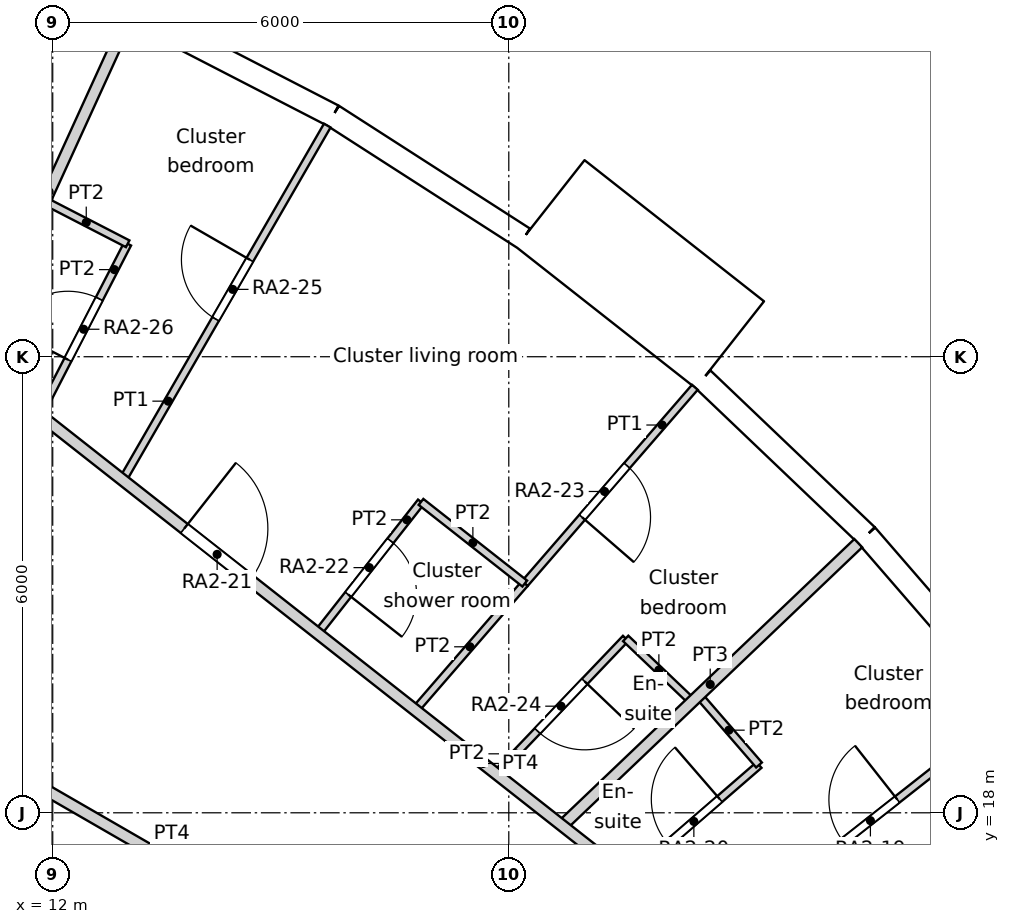
"""IFC4 building model, lengths in metres.
Left out: names, types, materials, properties, quantities, classifications, styles, units other than length and angle.
Written with IfcOpenShell. Run it as: python <this file> out.ifc"""

import sys

from ifc_helpers import new_model, si_unit, direction, frame, frame_2d, origin, origin_2d, place, context, subcontext, project, spatial, rectangle, circle, extrude, element, fill, save


model = new_model("IFC4")
c1 = context("Model", 3, precision=1e-05, world=origin(), true_north=direction((0.0, 1.0)))
c2 = subcontext(c1, "Body", "Model", "MODEL_VIEW")
j1 = project(units=[si_unit("LENGTHUNIT", "METRE"), si_unit("PLANEANGLEUNIT", "RADIAN")], contexts=[c1])
p1 = place(None, origin())
s1 = spatial("IfcSite", under=j1, at=p1, CompositionType="ELEMENT")
p2 = place(p1, origin())
s2 = spatial("IfcBuilding", under=s1, at=p2, CompositionType="ELEMENT")
p3 = place(p2, frame((0.0, 0.0, 39.0)))
s3 = spatial("IfcBuildingStorey", under=s2, at=p3, CompositionType="ELEMENT", Elevation=39.0)
for number, where, z_axis, x_axis in (
    (1, (21.911, 20.892, 0.0), (0.0, 0.0, 1.0), (1.0, 0.0, 0.0)),
    (2, (17.561, 24.661, 0.0), (0.0, 0.0, 1.0), (1.0, 0.0, 0.0)),
    (3, (12.576, 27.539, 0.0), (0.0, 0.0, 1.0), (1.0, 0.0, 0.0)),
):
    element("IfcColumn", number, at=place(p3, frame(where, z_axis=z_axis, x_axis=x_axis)), inside=s3, PredefinedType="COLUMN", context=c2, shape_type="SweptSolid", body=[
        extrude(circle(Radius=0.7, at=origin_2d()), origin(), (0.0, 0.0, 1.0), 3.6),
    ])
p4 = place(p3, frame((14.659, 19.69, 0.0), z_axis=(0.0, 0.0, 1.0), x_axis=(1.0, 0.0, 0.0)))
e4 = element("IfcColumn", 4, at=p4, inside=s3, PredefinedType="COLUMN", context=c2, shape_type="SweptSolid", body=[
    extrude(circle(Radius=0.75, at=origin_2d()), origin(), (0.0, 0.0, 1.0), 3.6),
])
p5 = place(p3, frame((24.658, 19.399, 0.0), z_axis=(0.0, 0.0, 1.0), x_axis=(-0.654830712471, 0.755775587066, 0.0)))
e5 = element("IfcWall", 5, at=p5, inside=s3, PredefinedType="SOLIDWALL", context=c2, shape_type="SweptSolid", body=[
    extrude(rectangle(XDim=2.98, YDim=0.3, at=frame_2d((1.49, 0.0))), origin(), (0.0, 0.0, 1.0), 3.15),
])
p6 = place(p5, frame((1.49, 0.0, 1.55)))
e6 = element("IfcOpeningElement", 6, at=p6, cuts=e5, PredefinedType="OPENING", context=c2, shape_type="SweptSolid", body=[
    extrude(circle(Radius=0.9, at=origin_2d()), frame((0.0, 0.16, 0.0), z_axis=(0.0, -1.0, 0.0), x_axis=(1.0, 0.0, 0.0)), (0.0, 0.0, 1.0), 0.32),
])
p7 = place(p3, frame((22.707, 21.651, 0.0), z_axis=(0.0, 0.0, 1.0), x_axis=(-0.723744206617, 0.690068346896, 0.0)))
e7 = element("IfcWall", 7, at=p7, inside=s3, PredefinedType="SOLIDWALL", context=c2, shape_type="SweptSolid", body=[
    extrude(rectangle(XDim=2.98, YDim=0.3, at=frame_2d((1.49, 0.0))), origin(), (0.0, 0.0, 1.0), 3.15),
])
p8 = place(p7, frame((1.49, 0.0, 1.55)))
e8 = element("IfcOpeningElement", 8, at=p8, cuts=e7, PredefinedType="OPENING", context=c2, shape_type="SweptSolid", body=[
    extrude(circle(Radius=0.9, at=origin_2d()), frame((0.0, 0.16, 0.0), z_axis=(0.0, -1.0, 0.0), x_axis=(1.0, 0.0, 0.0)), (0.0, 0.0, 1.0), 0.32),
])
p9 = place(p3, frame((20.907, 24.159, -0.45), z_axis=(0.0, 0.0, 1.0), x_axis=(-0.786049992888, 0.618162930529, 0.0)))
e9 = element("IfcWall", 9, at=p9, inside=s3, PredefinedType="ELEMENTEDWALL", context=c2, shape_type="SweptSolid", body=[
    extrude(rectangle(XDim=3.0, YDim=1.45, at=frame_2d((1.5, 0.0))), origin(), (0.0, 0.0, 1.0), 3.6),
])
p10 = place(p9, frame((1.5, 0.0, 2.0)))
e10 = element("IfcOpeningElement", 10, at=p10, cuts=e9, PredefinedType="OPENING", context=c2, shape_type="SweptSolid", body=[
    extrude(circle(Radius=0.9, at=origin_2d()), frame((0.0, 0.735, 0.0), z_axis=(0.0, -1.0, 0.0), x_axis=(1.0, 0.0, 0.0)), (0.0, 0.0, 1.0), 1.47),
])
p11 = place(p3, frame((18.194, 25.56, 0.0), z_axis=(0.0, 0.0, 1.0), x_axis=(-0.84122372879, 0.540687190639, 0.0)))
e11 = element("IfcWall", 11, at=p11, inside=s3, PredefinedType="SOLIDWALL", context=c2, shape_type="SweptSolid", body=[
    extrude(rectangle(XDim=2.98, YDim=0.3, at=frame_2d((1.49, 0.0))), origin(), (0.0, 0.0, 1.0), 3.15),
])
p12 = place(p11, frame((1.49, 0.0, 1.55)))
e12 = element("IfcOpeningElement", 12, at=p12, cuts=e11, PredefinedType="OPENING", context=c2, shape_type="SweptSolid", body=[
    extrude(circle(Radius=0.9, at=origin_2d()), frame((0.0, 0.16, 0.0), z_axis=(0.0, -1.0, 0.0), x_axis=(1.0, 0.0, 0.0)), (0.0, 0.0, 1.0), 0.32),
])
p13 = place(p3, frame((15.687, 27.171, 0.0), z_axis=(0.0, 0.0, 1.0), x_axis=(-0.888853225096, 0.4581920386, 0.0)))
e13 = element("IfcWall", 13, at=p13, inside=s3, PredefinedType="SOLIDWALL", context=c2, shape_type="SweptSolid", body=[
    extrude(rectangle(XDim=2.979, YDim=0.3, at=frame_2d((1.49, 0.0))), origin(), (0.0, 0.0, 1.0), 3.15),
])
p14 = place(p13, frame((1.49, 0.0, 1.55)))
e14 = element("IfcOpeningElement", 14, at=p14, cuts=e13, PredefinedType="OPENING", context=c2, shape_type="SweptSolid", body=[
    extrude(circle(Radius=0.9, at=origin_2d()), frame((0.0, 0.16, 0.0), z_axis=(0.0, -1.0, 0.0), x_axis=(1.0, 0.0, 0.0)), (0.0, 0.0, 1.0), 0.32),
])
p15 = place(p3, frame((10.933, 23.94, 0.0), z_axis=(0.0, 0.0, 1.0), x_axis=(0.786069782367, -0.618137765591, 0.0)))
e15 = element("IfcWall", 15, at=p15, inside=s3, PredefinedType="PARTITIONING", context=c2, shape_type="SweptSolid", body=[
    extrude(rectangle(XDim=12.41, YDim=0.15, at=frame_2d((6.205, 0.0))), origin(), (0.0, 0.0, 1.0), 3.15),
])
p16 = place(p15, frame((3.559, 0.0, 0.0)))
e16 = element("IfcOpeningElement", 16, at=p16, cuts=e15, PredefinedType="OPENING", context=c2, shape_type="SweptSolid", body=[
    extrude(rectangle(XDim=1.1, YDim=2.1, at=frame_2d((0.55, 1.05))), frame((0.0, 0.075, 0.0), z_axis=(0.0, -1.0, 0.0), x_axis=(1.0, 0.0, 0.0)), (0.0, 0.0, 1.0), 0.15),
])
p17 = place(p3, frame((11.336, 18.63, 0.0), z_axis=(0.0, 0.0, 1.0), x_axis=(0.866063337164, -0.499934291702, 0.0)))
e17 = element("IfcWall", 17, at=p17, inside=s3, PredefinedType="PARTITIONING", context=c2, shape_type="SweptSolid", body=[
    extrude(rectangle(XDim=5.155, YDim=0.15, at=frame_2d((2.577, 0.0))), origin(), (0.0, 0.0, 1.0), 3.15),
])
p18 = place(p3, frame((20.688, 16.269, 0.0), z_axis=(0.0, 0.0, 1.0), x_axis=(0.78599357822, 0.618234660139, 0.0)))
e18 = element("IfcWall", 18, at=p18, inside=s3, PredefinedType="PARTITIONING", context=c2, shape_type="SweptSolid", body=[
    extrude(rectangle(XDim=4.906, YDim=0.1, at=frame_2d((2.453, 0.0))), origin(), (0.0, 0.0, 1.0), 3.15),
])
p19 = place(p18, frame((2.183, 0.0, 0.0)))
e19 = element("IfcOpeningElement", 19, at=p19, cuts=e18, PredefinedType="OPENING", context=c2, shape_type="SweptSolid", body=[
    extrude(rectangle(XDim=0.9, YDim=2.1, at=frame_2d((0.45, 1.05))), frame((0.0, 0.05, 0.0), z_axis=(0.0, -1.0, 0.0), x_axis=(1.0, 0.0, 0.0)), (0.0, 0.0, 1.0), 0.1),
])
p20 = place(p3, frame((19.577, 17.143, 0.0), z_axis=(0.0, 0.0, 1.0), x_axis=(0.755813315469, 0.654787165543, 0.0)))
e20 = element("IfcWall", 20, at=p20, inside=s3, PredefinedType="PARTITIONING", context=c2, shape_type="SweptSolid", body=[
    extrude(rectangle(XDim=2.269, YDim=0.1, at=frame_2d((1.135, 0.0))), origin(), (0.0, 0.0, 1.0), 3.15),
])
p21 = place(p20, frame((0.685, 0.0, 0.0)))
e21 = element("IfcOpeningElement", 21, at=p21, cuts=e20, PredefinedType="OPENING", context=c2, shape_type="SweptSolid", body=[
    extrude(rectangle(XDim=0.9, YDim=2.04, at=frame_2d((0.45, 1.02))), frame((0.0, 0.05, 0.0), z_axis=(0.0, -1.0, 0.0), x_axis=(1.0, 0.0, 0.0)), (0.0, 0.0, 1.0), 0.1),
])
p22 = place(p3, frame((20.499, 19.545, 0.0), z_axis=(0.0, 0.0, 1.0), x_axis=(0.654500819756, -0.756061291787, 0.0)))
e22 = element("IfcWall", 22, at=p22, inside=s3, PredefinedType="PARTITIONING", context=c2, shape_type="SweptSolid", body=[
    extrude(rectangle(XDim=1.212, YDim=0.1, at=frame_2d((0.606, 0.0))), origin(), (0.0, 0.0, 1.0), 3.15),
])
p23 = place(p3, frame((18.702, 17.831, 0.0), z_axis=(0.0, 0.0, 1.0), x_axis=(0.723619032975, 0.690199605271, 0.0)))
e23 = element("IfcWall", 23, at=p23, inside=s3, PredefinedType="PARTITIONING", context=c2, shape_type="SweptSolid", body=[
    extrude(rectangle(XDim=5.384, YDim=0.15, at=frame_2d((2.692, 0.0))), origin(), (0.0, 0.0, 1.0), 3.15),
])
p24 = place(p3, frame((16.845, 22.09, 0.0), z_axis=(0.0, 0.0, 1.0), x_axis=(0.785903559082, -0.618349088964, 0.0)))
e24 = element("IfcWall", 24, at=p24, inside=s3, PredefinedType="PARTITIONING", context=c2, shape_type="SweptSolid", body=[
    extrude(rectangle(XDim=1.737, YDim=0.1, at=frame_2d((0.868, 0.0))), origin(), (0.0, 0.0, 1.0), 3.15),
])
p25 = place(p3, frame((15.485, 20.361, 0.0), z_axis=(0.0, 0.0, 1.0), x_axis=(0.618203810204, 0.786017842704, 0.0)))
e25 = element("IfcWall", 25, at=p25, inside=s3, PredefinedType="PARTITIONING", context=c2, shape_type="SweptSolid", body=[
    extrude(rectangle(XDim=2.2, YDim=0.1, at=frame_2d((1.1, 0.0))), origin(), (0.0, 0.0, 1.0), 3.15),
])
p26 = place(p25, frame((0.65, 0.0, 0.0)))
e26 = element("IfcOpeningElement", 26, at=p26, cuts=e25, PredefinedType="OPENING", context=c2, shape_type="SweptSolid", body=[
    extrude(rectangle(XDim=0.9, YDim=2.0, at=frame_2d((0.45, 1.0))), frame((0.0, 0.05, 0.0), z_axis=(0.0, -1.0, 0.0), x_axis=(1.0, 0.0, 0.0)), (0.0, 0.0, 1.0), 0.1),
])
p27 = place(p3, frame((18.21, 21.016, 0.0), z_axis=(0.0, 0.0, 1.0), x_axis=(0.655012143666, 0.755618350525, 0.0)))
e27 = element("IfcWall", 27, at=p27, inside=s3, PredefinedType="PARTITIONING", context=c2, shape_type="SweptSolid", body=[
    extrude(rectangle(XDim=3.417, YDim=0.1, at=frame_2d((1.708, 0.0))), origin(), (0.0, 0.0, 1.0), 3.15),
])
p28 = place(p27, frame((1.153, 0.0, 0.0)))
e28 = element("IfcOpeningElement", 28, at=p28, cuts=e27, PredefinedType="OPENING", context=c2, shape_type="SweptSolid", body=[
    extrude(rectangle(XDim=0.9, YDim=2.1, at=frame_2d((0.45, 1.05))), frame((0.0, 0.05, 0.0), z_axis=(0.0, -1.0, 0.0), x_axis=(1.0, 0.0, 0.0)), (0.0, 0.0, 1.0), 0.1),
])
p29 = place(p3, frame((12.92, 22.378, 0.0), z_axis=(0.0, 0.0, 1.0), x_axis=(0.49998673258, 0.866033063597, 0.0)))
e29 = element("IfcWall", 29, at=p29, inside=s3, PredefinedType="PARTITIONING", context=c2, shape_type="SweptSolid", body=[
    extrude(rectangle(XDim=5.385, YDim=0.1, at=frame_2d((2.692, 0.0))), origin(), (0.0, 0.0, 1.0), 3.15),
])
p30 = place(p29, frame((2.446, 0.0, 0.0)))
e30 = element("IfcOpeningElement", 30, at=p30, cuts=e29, PredefinedType="OPENING", context=c2, shape_type="SweptSolid", body=[
    extrude(rectangle(XDim=0.9, YDim=2.1, at=frame_2d((0.45, 1.05))), frame((0.0, 0.05, 0.0), z_axis=(0.0, -1.0, 0.0), x_axis=(1.0, 0.0, 0.0)), (0.0, 0.0, 1.0), 0.1),
])
p31 = place(p3, frame((16.768, 19.352, 0.0), z_axis=(0.0, 0.0, 1.0), x_axis=(0.654854551667, 0.755754931284, 0.0)))
e31 = element("IfcWall", 31, at=p31, inside=s3, PredefinedType="PARTITIONING", context=c2, shape_type="SweptSolid", body=[
    extrude(rectangle(XDim=2.202, YDim=0.1, at=frame_2d((1.101, 0.0))), origin(), (0.0, 0.0, 1.0), 3.15),
])
p32 = place(p3, frame((19.538, 20.294, 0.0), z_axis=(0.0, 0.0, 1.0), x_axis=(0.723810439605, -0.689998875013, 0.0)))
e32 = element("IfcWall", 32, at=p32, inside=s3, PredefinedType="PARTITIONING", context=c2, shape_type="SweptSolid", body=[
    extrude(rectangle(XDim=1.206, YDim=0.1, at=frame_2d((0.603, 0.0))), origin(), (0.0, 0.0, 1.0), 3.15),
])
p33 = place(p3, frame((17.837, 18.511, 0.0), z_axis=(0.0, 0.0, 1.0), x_axis=(0.690317861289, 0.723506220005, 0.0)))
e33 = element("IfcWall", 33, at=p33, inside=s3, PredefinedType="PARTITIONING", context=c2, shape_type="SweptSolid", body=[
    extrude(rectangle(XDim=2.464, YDim=0.1, at=frame_2d((1.232, 0.0))), origin(), (0.0, 0.0, 1.0), 3.15),
])
p34 = place(p33, frame((0.782, 0.0, 0.0)))
e34 = element("IfcOpeningElement", 34, at=p34, cuts=e33, PredefinedType="OPENING", context=c2, shape_type="SweptSolid", body=[
    extrude(rectangle(XDim=0.9, YDim=2.04, at=frame_2d((0.45, 1.02))), frame((0.0, 0.05, 0.0), z_axis=(0.0, -1.0, 0.0), x_axis=(1.0, 0.0, 0.0)), (0.0, 0.0, 1.0), 0.1),
])
p35 = place(p3, frame((11.827, 23.237, 0.0), z_axis=(0.0, 0.0, 1.0), x_axis=(0.45814144004, 0.888879306159, 0.0)))
e35 = element("IfcWall", 35, at=p35, inside=s3, PredefinedType="PARTITIONING", context=c2, shape_type="SweptSolid", body=[
    extrude(rectangle(XDim=2.53, YDim=0.1, at=frame_2d((1.265, 0.0))), origin(), (0.0, 0.0, 1.0), 3.15),
])
p36 = place(p35, frame((0.815, 0.0, 0.0)))
e36 = element("IfcOpeningElement", 36, at=p36, cuts=e35, PredefinedType="OPENING", context=c2, shape_type="SweptSolid", body=[
    extrude(rectangle(XDim=0.9, YDim=2.04, at=frame_2d((0.45, 1.02))), frame((0.0, 0.05, 0.0), z_axis=(0.0, -1.0, 0.0), x_axis=(1.0, 0.0, 0.0)), (0.0, 0.0, 1.0), 0.1),
])
p37 = place(p3, frame((11.896, 26.048, 0.0), z_axis=(0.0, 0.0, 1.0), x_axis=(0.888824704595, -0.458247361697, 0.0)))
e37 = element("IfcWall", 37, at=p37, inside=s3, PredefinedType="PARTITIONING", context=c2, shape_type="SweptSolid", body=[
    extrude(rectangle(XDim=1.226, YDim=0.1, at=frame_2d((0.613, 0.0))), origin(), (0.0, 0.0, 1.0), 3.15),
])
p38 = place(p3, frame((10.934, 23.94, 0.0), z_axis=(0.0, 0.0, 1.0), x_axis=(0.415245800153, 0.909709253254, 0.0)))
e38 = element("IfcWall", 38, at=p38, inside=s3, PredefinedType="PARTITIONING", context=c2, shape_type="SweptSolid", body=[
    extrude(rectangle(XDim=4.906, YDim=0.15, at=frame_2d((2.453, 0.0))), origin(), (0.0, 0.0, 1.0), 3.15),
])
p39 = place(p6, origin())
e39 = element("IfcWindow", 39, at=p39, inside=s3, PartitioningType="SINGLE_PANEL", PredefinedType="WINDOW", context=c2, shape_type="SweptSolid", body=[
    extrude(circle(Radius=0.9, at=origin_2d()), frame((0.0, 0.12, 0.0), z_axis=(0.0, -1.0, 0.0), x_axis=(1.0, 0.0, 0.0)), (0.0, 0.0, 1.0), 0.1),
])
fill(e6, e39)
p40 = place(p8, origin())
e40 = element("IfcWindow", 40, at=p40, inside=s3, PartitioningType="SINGLE_PANEL", PredefinedType="WINDOW", context=c2, shape_type="SweptSolid", body=[
    extrude(circle(Radius=0.9, at=origin_2d()), frame((0.0, 0.12, 0.0), z_axis=(0.0, -1.0, 0.0), x_axis=(1.0, 0.0, 0.0)), (0.0, 0.0, 1.0), 0.1),
])
fill(e8, e40)
p41 = place(p10, origin())
e41 = element("IfcWindow", 41, at=p41, inside=s3, PartitioningType="SINGLE_PANEL", PredefinedType="WINDOW", context=c2, shape_type="SweptSolid", body=[
    extrude(circle(Radius=0.9, at=origin_2d()), frame((0.0, 0.695, 0.0), z_axis=(0.0, -1.0, 0.0), x_axis=(1.0, 0.0, 0.0)), (0.0, 0.0, 1.0), 0.1),
])
fill(e10, e41)
p42 = place(p12, origin())
e42 = element("IfcWindow", 42, at=p42, inside=s3, PartitioningType="SINGLE_PANEL", PredefinedType="WINDOW", context=c2, shape_type="SweptSolid", body=[
    extrude(circle(Radius=0.9, at=origin_2d()), frame((0.0, 0.12, 0.0), z_axis=(0.0, -1.0, 0.0), x_axis=(1.0, 0.0, 0.0)), (0.0, 0.0, 1.0), 0.1),
])
fill(e12, e42)
p43 = place(p14, origin())
e43 = element("IfcWindow", 43, at=p43, inside=s3, PartitioningType="SINGLE_PANEL", PredefinedType="WINDOW", context=c2, shape_type="SweptSolid", body=[
    extrude(circle(Radius=0.9, at=origin_2d()), frame((0.0, 0.12, 0.0), z_axis=(0.0, -1.0, 0.0), x_axis=(1.0, 0.0, 0.0)), (0.0, 0.0, 1.0), 0.1),
])
fill(e14, e43)
p44 = place(p19, origin())
e44 = element("IfcDoor", 44, at=p44, inside=s3, OperationType="SINGLE_SWING_RIGHT", PredefinedType="DOOR", context=c2, shape_type="SweptSolid", body=[
    extrude(rectangle(XDim=0.9, YDim=2.1, at=frame_2d((0.45, 1.05))), frame((0.0, 0.025, 0.0), z_axis=(0.0, -1.0, 0.0), x_axis=(1.0, 0.0, 0.0)), (0.0, 0.0, 1.0), 0.05),
])
fill(e19, e44)
p45 = place(p21, origin())
e45 = element("IfcDoor", 45, at=p45, inside=s3, OperationType="SINGLE_SWING_RIGHT", PredefinedType="DOOR", context=c2, shape_type="SweptSolid", body=[
    extrude(rectangle(XDim=0.9, YDim=2.04, at=frame_2d((0.45, 1.02))), frame((0.0, 0.025, 0.0), z_axis=(0.0, -1.0, 0.0), x_axis=(1.0, 0.0, 0.0)), (0.0, 0.0, 1.0), 0.05),
])
fill(e21, e45)
p46 = place(p16, origin())
e46 = element("IfcDoor", 46, at=p46, inside=s3, OperationType="SINGLE_SWING_LEFT", PredefinedType="DOOR", context=c2, shape_type="SweptSolid", body=[
    extrude(rectangle(XDim=1.1, YDim=2.1, at=frame_2d((0.55, 1.05))), frame((0.0, 0.025, 0.0), z_axis=(0.0, -1.0, 0.0), x_axis=(1.0, 0.0, 0.0)), (0.0, 0.0, 1.0), 0.05),
])
fill(e16, e46)
p47 = place(p26, origin())
e47 = element("IfcDoor", 47, at=p47, inside=s3, OperationType="SINGLE_SWING_RIGHT", PredefinedType="DOOR", context=c2, shape_type="SweptSolid", body=[
    extrude(rectangle(XDim=0.9, YDim=2.0, at=frame_2d((0.45, 1.0))), frame((0.0, 0.025, 0.0), z_axis=(0.0, -1.0, 0.0), x_axis=(1.0, 0.0, 0.0)), (0.0, 0.0, 1.0), 0.05),
])
fill(e26, e47)
p48 = place(p28, origin())
e48 = element("IfcDoor", 48, at=p48, inside=s3, OperationType="SINGLE_SWING_RIGHT", PredefinedType="DOOR", context=c2, shape_type="SweptSolid", body=[
    extrude(rectangle(XDim=0.9, YDim=2.1, at=frame_2d((0.45, 1.05))), frame((0.0, 0.025, 0.0), z_axis=(0.0, -1.0, 0.0), x_axis=(1.0, 0.0, 0.0)), (0.0, 0.0, 1.0), 0.05),
])
fill(e28, e48)
p49 = place(p34, origin())
e49 = element("IfcDoor", 49, at=p49, inside=s3, OperationType="SINGLE_SWING_LEFT", PredefinedType="DOOR", context=c2, shape_type="SweptSolid", body=[
    extrude(rectangle(XDim=0.9, YDim=2.04, at=frame_2d((0.45, 1.02))), frame((0.0, 0.025, 0.0), z_axis=(0.0, -1.0, 0.0), x_axis=(1.0, 0.0, 0.0)), (0.0, 0.0, 1.0), 0.05),
])
fill(e34, e49)
p50 = place(p30, origin())
e50 = element("IfcDoor", 50, at=p50, inside=s3, OperationType="SINGLE_SWING_RIGHT", PredefinedType="DOOR", context=c2, shape_type="SweptSolid", body=[
    extrude(rectangle(XDim=0.9, YDim=2.1, at=frame_2d((0.45, 1.05))), frame((0.0, 0.025, 0.0), z_axis=(0.0, -1.0, 0.0), x_axis=(1.0, 0.0, 0.0)), (0.0, 0.0, 1.0), 0.05),
])
fill(e30, e50)
p51 = place(p36, origin())
e51 = element("IfcDoor", 51, at=p51, inside=s3, OperationType="SINGLE_SWING_LEFT", PredefinedType="DOOR", context=c2, shape_type="SweptSolid", body=[
    extrude(rectangle(XDim=0.9, YDim=2.04, at=frame_2d((0.45, 1.02))), frame((0.0, 0.025, 0.0), z_axis=(0.0, -1.0, 0.0), x_axis=(1.0, 0.0, 0.0)), (0.0, 0.0, 1.0), 0.05),
])
fill(e36, e51)
save(model, sys.argv[1])
